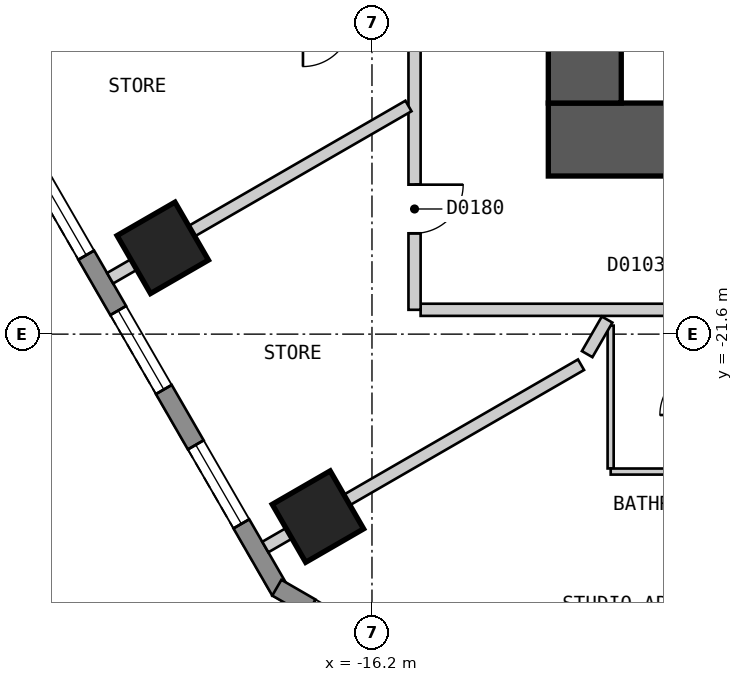
"""IFC4 building model, lengths in metres.
Left out: names, types, materials, properties, quantities, classifications, styles, units other than length and angle.
Written with IfcOpenShell. Run it as: python <this file> out.ifc"""

import sys

from ifc_helpers import new_model, si_unit, direction, frame, frame_2d, origin, origin_2d, place, context, subcontext, project, spatial, polyline, rectangle, outline, extrude, element, fill, save


model = new_model("IFC4")
c1 = context("Model", 3, precision=1e-05, world=origin(), true_north=direction((0.0, 1.0)))
c2 = subcontext(c1, "Body", "Model", "MODEL_VIEW")
j1 = project(units=[si_unit("LENGTHUNIT", "METRE"), si_unit("PLANEANGLEUNIT", "RADIAN")], contexts=[c1])
p1 = place(None, origin())
s1 = spatial("IfcSite", under=j1, at=p1, CompositionType="ELEMENT")
p2 = place(p1, origin())
s2 = spatial("IfcBuilding", under=s1, at=p2, CompositionType="ELEMENT")
p3 = place(p2, frame((0.0, 0.0, 23.4)))
s3 = spatial("IfcBuildingStorey", under=s2, at=p3, CompositionType="ELEMENT", Elevation=23.4)
for number, where, z_axis, x_axis in (
    (1, (-19.641, -20.181, 0.0), (0.0, 0.0, 1.0), (0.5, -0.866, 0.0)),
    (2, (-17.089, -24.601, 0.0), (0.0, 0.0, 1.0), (0.5, -0.866, 0.0)),
):
    element("IfcColumn", number, at=place(p3, frame(where, z_axis=z_axis, x_axis=x_axis)), inside=s3, PredefinedType="COLUMN", context=c2, shape_type="SweptSolid", body=[
        extrude(rectangle(XDim=1.1, YDim=1.1, at=origin_2d()), origin(), (0.0, 0.0, 1.0), 3.0),
    ])
p4 = place(p3, frame((-13.3, -18.4, 0.0), z_axis=(0.0, 0.0, 1.0), x_axis=(1.0, 0.0, 0.0)))
e3 = element("IfcWall", 3, at=p4, inside=s3, PredefinedType="SHEAR", context=c2, shape_type="SweptSolid", body=[
    extrude(rectangle(XDim=26.6, YDim=1.2, at=frame_2d((13.3, 0.0))), origin(), (0.0, 0.0, 1.0), 2.7),
])
p5 = place(p3, frame((-12.7, -17.8, 0.0), z_axis=(0.0, 0.0, 1.0), x_axis=(0.0, 1.0, 0.0)))
e4 = element("IfcWall", 4, at=p5, inside=s3, PredefinedType="SHEAR", context=c2, shape_type="SweptSolid", body=[
    extrude(rectangle(XDim=11.6, YDim=1.2, at=frame_2d((5.8, 0.0))), origin(), (0.0, 0.0, 1.0), 2.7),
])
p6 = place(p5, frame((3.6, 0.0, 0.0)))
e5 = element("IfcOpeningElement", 5, at=p6, cuts=e4, PredefinedType="OPENING", context=c2, shape_type="SweptSolid", body=[
    extrude(rectangle(XDim=1.2, YDim=2.1, at=frame_2d((0.6, 1.05))), frame((0.0, 0.61, 0.0), z_axis=(0.0, -1.0, 0.0), x_axis=(1.0, 0.0, 0.0)), (0.0, 0.0, 1.0), 1.22),
])
p7 = place(p3, frame((-31.22, -2.425, 0.0), z_axis=(0.0, 0.0, 1.0), x_axis=(0.500001938803, -0.866024284413, 0.0)))
e6 = element("IfcWall", 6, at=p7, inside=s3, PredefinedType="SOLIDWALL", context=c2, shape_type="SweptSolid", body=[
    extrude(outline(polyline([(0.0, -0.15), (27.02, -0.15), (26.94, 0.15), (0.08, 0.15), (0.0, -0.15)])), origin(), (0.0, 0.0, 1.0), 2.7),
])
p8 = place(p7, frame((1.277, 0.0, 0.15)))
e7 = element("IfcOpeningElement", 7, at=p8, cuts=e6, PredefinedType="OPENING", context=c2, shape_type="SweptSolid", body=[
    extrude(rectangle(XDim=1.5, YDim=2.1, at=frame_2d((0.75, 1.05))), frame((0.0, 0.16, 0.0), z_axis=(0.0, -1.0, 0.0), x_axis=(1.0, 0.0, 0.0)), (0.0, 0.0, 1.0), 0.32),
])
p9 = place(p7, frame((3.829, 0.0, 0.15)))
e8 = element("IfcOpeningElement", 8, at=p9, cuts=e6, PredefinedType="OPENING", context=c2, shape_type="SweptSolid", body=[
    extrude(rectangle(XDim=1.5, YDim=2.1, at=frame_2d((0.75, 1.05))), frame((0.0, 0.16, 0.0), z_axis=(0.0, -1.0, 0.0), x_axis=(1.0, 0.0, 0.0)), (0.0, 0.0, 1.0), 0.32),
])
p10 = place(p7, frame((6.382, 0.0, 0.15)))
e9 = element("IfcOpeningElement", 9, at=p10, cuts=e6, PredefinedType="OPENING", context=c2, shape_type="SweptSolid", body=[
    extrude(rectangle(XDim=1.5, YDim=2.1, at=frame_2d((0.75, 1.05))), frame((0.0, 0.16, 0.0), z_axis=(0.0, -1.0, 0.0), x_axis=(1.0, 0.0, 0.0)), (0.0, 0.0, 1.0), 0.32),
])
p11 = place(p7, frame((8.933, 0.0, 0.15)))
e10 = element("IfcOpeningElement", 10, at=p11, cuts=e6, PredefinedType="OPENING", context=c2, shape_type="SweptSolid", body=[
    extrude(rectangle(XDim=1.5, YDim=2.1, at=frame_2d((0.75, 1.05))), frame((0.0, 0.16, 0.0), z_axis=(0.0, -1.0, 0.0), x_axis=(1.0, 0.0, 0.0)), (0.0, 0.0, 1.0), 0.32),
])
p12 = place(p7, frame((11.485, 0.0, 0.15)))
e11 = element("IfcOpeningElement", 11, at=p12, cuts=e6, PredefinedType="OPENING", context=c2, shape_type="SweptSolid", body=[
    extrude(rectangle(XDim=1.5, YDim=2.1, at=frame_2d((0.75, 1.05))), frame((0.0, 0.16, 0.0), z_axis=(0.0, -1.0, 0.0), x_axis=(1.0, 0.0, 0.0)), (0.0, 0.0, 1.0), 0.32),
])
p13 = place(p7, frame((14.037, 0.0, 0.15)))
e12 = element("IfcOpeningElement", 12, at=p13, cuts=e6, PredefinedType="OPENING", context=c2, shape_type="SweptSolid", body=[
    extrude(rectangle(XDim=1.5, YDim=2.1, at=frame_2d((0.75, 1.05))), frame((0.0, 0.16, 0.0), z_axis=(0.0, -1.0, 0.0), x_axis=(1.0, 0.0, 0.0)), (0.0, 0.0, 1.0), 0.32),
])
p14 = place(p7, frame((16.589, 0.0, 0.15)))
e13 = element("IfcOpeningElement", 13, at=p14, cuts=e6, PredefinedType="OPENING", context=c2, shape_type="SweptSolid", body=[
    extrude(rectangle(XDim=1.5, YDim=2.1, at=frame_2d((0.75, 1.05))), frame((0.0, 0.16, 0.0), z_axis=(0.0, -1.0, 0.0), x_axis=(1.0, 0.0, 0.0)), (0.0, 0.0, 1.0), 0.32),
])
p15 = place(p7, frame((19.141, 0.0, 0.15)))
e14 = element("IfcOpeningElement", 14, at=p15, cuts=e6, PredefinedType="OPENING", context=c2, shape_type="SweptSolid", body=[
    extrude(rectangle(XDim=1.5, YDim=2.1, at=frame_2d((0.75, 1.05))), frame((0.0, 0.16, 0.0), z_axis=(0.0, -1.0, 0.0), x_axis=(1.0, 0.0, 0.0)), (0.0, 0.0, 1.0), 0.32),
])
p16 = place(p7, frame((21.693, 0.0, 0.15)))
e15 = element("IfcOpeningElement", 15, at=p16, cuts=e6, PredefinedType="OPENING", context=c2, shape_type="SweptSolid", body=[
    extrude(rectangle(XDim=1.5, YDim=2.1, at=frame_2d((0.75, 1.05))), frame((0.0, 0.16, 0.0), z_axis=(0.0, -1.0, 0.0), x_axis=(1.0, 0.0, 0.0)), (0.0, 0.0, 1.0), 0.32),
])
p17 = place(p7, frame((24.244, 0.0, 0.15)))
e16 = element("IfcOpeningElement", 16, at=p17, cuts=e6, PredefinedType="OPENING", context=c2, shape_type="SweptSolid", body=[
    extrude(rectangle(XDim=1.5, YDim=2.1, at=frame_2d((0.75, 1.05))), frame((0.0, 0.16, 0.0), z_axis=(0.0, -1.0, 0.0), x_axis=(1.0, 0.0, 0.0)), (0.0, 0.0, 1.0), 0.32),
])
p18 = place(p3, frame((-17.765, -25.77, 0.0), z_axis=(0.0, 0.0, 1.0), x_axis=(0.866010750942, -0.50002537861, 0.0)))
e17 = element("IfcWall", 17, at=p18, inside=s3, PredefinedType="SOLIDWALL", context=c2, shape_type="SweptSolid", body=[
    extrude(outline(polyline([(0.0, -0.15), (5.0, -0.15), (4.919, 0.15), (0.08, 0.15), (0.0, -0.15)])), origin(), (0.0, 0.0, 1.0), 2.7),
])
p19 = place(p18, frame((0.65, 0.0, 0.15)))
e18 = element("IfcOpeningElement", 18, at=p19, cuts=e17, PredefinedType="OPENING", context=c2, shape_type="SweptSolid", body=[
    extrude(rectangle(XDim=1.2, YDim=2.1, at=frame_2d((0.6, 1.05))), frame((0.0, 0.16, 0.0), z_axis=(0.0, -1.0, 0.0), x_axis=(1.0, 0.0, 0.0)), (0.0, 0.0, 1.0), 0.32),
])
p20 = place(p18, frame((3.15, 0.0, 0.15)))
e19 = element("IfcOpeningElement", 19, at=p20, cuts=e17, PredefinedType="OPENING", context=c2, shape_type="SweptSolid", body=[
    extrude(rectangle(XDim=1.2, YDim=2.1, at=frame_2d((0.6, 1.05))), frame((0.0, 0.16, 0.0), z_axis=(0.0, -1.0, 0.0), x_axis=(1.0, 0.0, 0.0)), (0.0, 0.0, 1.0), 0.32),
])
p21 = place(p3, frame((-15.4, -21.2, 0.0), z_axis=(0.0, 0.0, 1.0), x_axis=(1.0, 0.0, 0.0)))
e20 = element("IfcWall", 20, at=p21, inside=s3, PredefinedType="PARTITIONING", context=c2, shape_type="SweptSolid", body=[
    extrude(rectangle(XDim=30.799, YDim=0.2, at=frame_2d((15.399, 0.0))), origin(), (0.0, 0.0, 1.0), 2.7),
])
p22 = place(p21, frame((4.985, 0.0, 0.0)))
e21 = element("IfcOpeningElement", 21, at=p22, cuts=e20, PredefinedType="OPENING", context=c2, shape_type="SweptSolid", body=[
    extrude(rectangle(XDim=0.9, YDim=2.1, at=frame_2d((0.45, 1.05))), frame((0.0, 0.11, 0.0), z_axis=(0.0, -1.0, 0.0), x_axis=(1.0, 0.0, 0.0)), (0.0, 0.0, 1.0), 0.22),
])
p23 = place(p21, frame((14.901, 0.0, 0.0)))
e22 = element("IfcOpeningElement", 22, at=p23, cuts=e20, PredefinedType="OPENING", context=c2, shape_type="SweptSolid", body=[
    extrude(rectangle(XDim=1.0, YDim=2.1, at=frame_2d((0.5, 1.05))), frame((0.0, 0.11, 0.0), z_axis=(0.0, -1.0, 0.0), x_axis=(1.0, 0.0, 0.0)), (0.0, 0.0, 1.0), 0.22),
])
p24 = place(p21, frame((20.005, 0.0, 0.0)))
e23 = element("IfcOpeningElement", 23, at=p24, cuts=e20, PredefinedType="OPENING", context=c2, shape_type="SweptSolid", body=[
    extrude(rectangle(XDim=1.0, YDim=2.1, at=frame_2d((0.5, 1.05))), frame((0.0, 0.11, 0.0), z_axis=(0.0, -1.0, 0.0), x_axis=(1.0, 0.0, 0.0)), (0.0, 0.0, 1.0), 0.22),
])
p25 = place(p21, frame((24.916, 0.0, 0.0)))
e24 = element("IfcOpeningElement", 24, at=p25, cuts=e20, PredefinedType="OPENING", context=c2, shape_type="SweptSolid", body=[
    extrude(rectangle(XDim=0.9, YDim=2.1, at=frame_2d((0.45, 1.05))), frame((0.0, 0.11, 0.0), z_axis=(0.0, -1.0, 0.0), x_axis=(1.0, 0.0, 0.0)), (0.0, 0.0, 1.0), 0.22),
])
p26 = place(p3, frame((-15.5, -21.2, 0.0), z_axis=(0.0, 0.0, 1.0), x_axis=(0.0, 1.0, 0.0)))
e25 = element("IfcWall", 25, at=p26, inside=s3, PredefinedType="PARTITIONING", context=c2, shape_type="SweptSolid", body=[
    extrude(rectangle(XDim=4.8, YDim=0.2, at=frame_2d((2.4, 0.0))), origin(), (0.0, 0.0, 1.0), 2.7),
])
p27 = place(p26, frame((1.258, 0.0, 0.0)))
e26 = element("IfcOpeningElement", 26, at=p27, cuts=e25, PredefinedType="OPENING", context=c2, shape_type="SweptSolid", body=[
    extrude(rectangle(XDim=0.8, YDim=2.1, at=frame_2d((0.4, 1.05))), frame((0.0, 0.11, 0.0), z_axis=(0.0, -1.0, 0.0), x_axis=(1.0, 0.0, 0.0)), (0.0, 0.0, 1.0), 0.22),
])
p28 = place(p3, frame((-12.275, -21.46, 0.0), z_axis=(0.0, 0.0, 1.0), x_axis=(0.0, -1.0, 0.0)))
e27 = element("IfcWall", 27, at=p28, inside=s3, PredefinedType="PARTITIONING", context=c2, shape_type="SweptSolid", body=[
    extrude(rectangle(XDim=2.349, YDim=0.1, at=frame_2d((1.175, 0.0))), origin(), (0.0, 0.0, 1.0), 2.7),
])
p29 = place(p3, frame((-12.274, -23.86, 0.0), z_axis=(0.0, 0.0, 1.0), x_axis=(1.0, 0.0, 0.0)))
e28 = element("IfcWall", 28, at=p29, inside=s3, PredefinedType="PARTITIONING", context=c2, shape_type="SweptSolid", body=[
    extrude(rectangle(XDim=2.958, YDim=0.1, at=frame_2d((1.479, 0.0))), origin(), (0.0, 0.0, 1.0), 2.7),
])
p30 = place(p3, frame((-12.661, -21.929, 0.0), z_axis=(0.0, 0.0, 1.0), x_axis=(0.499379051742, 0.866383611734, 0.0)))
e29 = element("IfcWall", 29, at=p30, inside=s3, PredefinedType="PARTITIONING", context=c2, shape_type="SweptSolid", body=[
    extrude(rectangle(XDim=0.656, YDim=0.2, at=frame_2d((0.328, 0.0))), origin(), (0.0, 0.0, 1.0), 2.7),
])
p31 = place(p3, frame((-20.507, -20.681, 0.0), z_axis=(0.0, 0.0, 1.0), x_axis=(0.866028446103, 0.499994730513, 0.0)))
e30 = element("IfcWall", 30, at=p31, inside=s3, PredefinedType="PARTITIONING", context=c2, shape_type="SweptSolid", body=[
    extrude(rectangle(XDim=5.666, YDim=0.2, at=frame_2d((2.833, 0.0))), origin(), (0.0, 0.0, 1.0), 2.7),
])
p32 = place(p3, frame((-17.954, -25.101, 0.0), z_axis=(0.0, 0.0, 1.0), x_axis=(0.865999098103, 0.500045560009, 0.0)))
e31 = element("IfcWall", 31, at=p32, inside=s3, PredefinedType="PARTITIONING", context=c2, shape_type="SweptSolid", body=[
    extrude(rectangle(XDim=5.996, YDim=0.2, at=frame_2d((2.998, 0.0))), origin(), (0.0, 0.0, 1.0), 2.7),
])
p33 = place(p15, origin())
e32 = element("IfcWindow", 32, at=p33, inside=s3, PartitioningType="SINGLE_PANEL", PredefinedType="WINDOW", context=c2, shape_type="SweptSolid", body=[
    extrude(rectangle(XDim=1.5, YDim=2.1, at=frame_2d((0.75, 1.05))), frame((0.0, 0.03, 0.0), z_axis=(0.0, -1.0, 0.0), x_axis=(1.0, 0.0, 0.0)), (0.0, 0.0, 1.0), 0.06),
])
fill(e14, e32)
p34 = place(p16, origin())
e33 = element("IfcWindow", 33, at=p34, inside=s3, PartitioningType="SINGLE_PANEL", PredefinedType="WINDOW", context=c2, shape_type="SweptSolid", body=[
    extrude(rectangle(XDim=1.5, YDim=2.1, at=frame_2d((0.75, 1.05))), frame((0.0, 0.03, 0.0), z_axis=(0.0, -1.0, 0.0), x_axis=(1.0, 0.0, 0.0)), (0.0, 0.0, 1.0), 0.06),
])
fill(e15, e33)
p35 = place(p17, origin())
e34 = element("IfcWindow", 34, at=p35, inside=s3, PartitioningType="SINGLE_PANEL", PredefinedType="WINDOW", context=c2, shape_type="SweptSolid", body=[
    extrude(rectangle(XDim=1.5, YDim=2.1, at=frame_2d((0.75, 1.05))), frame((0.0, 0.03, 0.0), z_axis=(0.0, -1.0, 0.0), x_axis=(1.0, 0.0, 0.0)), (0.0, 0.0, 1.0), 0.06),
])
fill(e16, e34)
p36 = place(p27, origin())
e35 = element("IfcDoor", 35, at=p36, inside=s3, OperationType="SINGLE_SWING_RIGHT", PredefinedType="DOOR", context=c2, shape_type="SweptSolid", body=[
    extrude(rectangle(XDim=0.8, YDim=2.1, at=frame_2d((0.4, 1.05))), frame((0.0, 0.025, 0.0), z_axis=(0.0, -1.0, 0.0), x_axis=(1.0, 0.0, 0.0)), (0.0, 0.0, 1.0), 0.05),
])
fill(e26, e35)
save(model, sys.argv[1])
